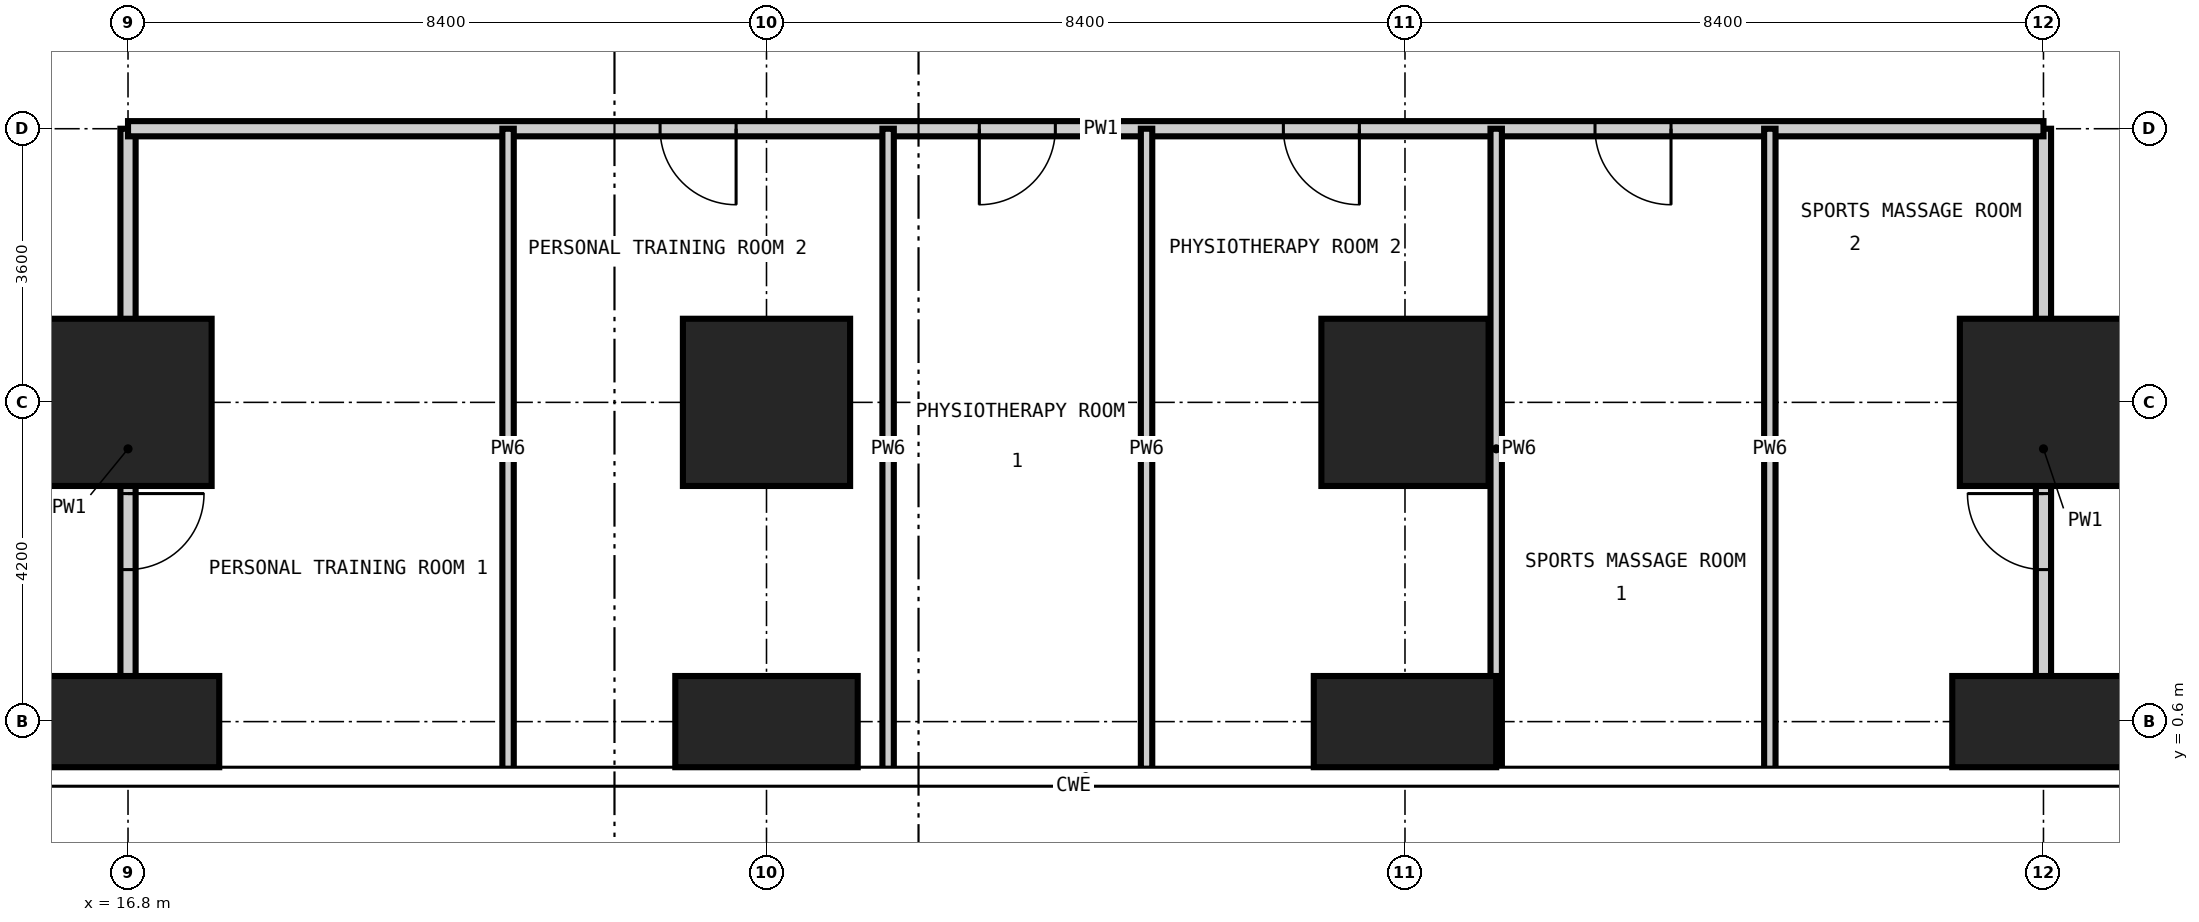
"""IFC4 building model, lengths in metres.
Left out: names, types, materials, properties, quantities, classifications, styles, units other than length and angle.
Written with IfcOpenShell. Run it as: python <this file> out.ifc"""

import sys

from ifc_helpers import new_model, si_unit, direction, frame, frame_2d, origin, origin_2d, place, context, subcontext, project, spatial, rectangle, extrude, element, fill, save


model = new_model("IFC4")
c1 = context("Model", 3, precision=1e-05, world=origin(), true_north=direction((0.0, 1.0)))
c2 = subcontext(c1, "Body", "Model", "MODEL_VIEW")
j1 = project(units=[si_unit("LENGTHUNIT", "METRE"), si_unit("PLANEANGLEUNIT", "RADIAN")], contexts=[c1])
p1 = place(None, origin())
s1 = spatial("IfcSite", under=j1, at=p1, CompositionType="ELEMENT")
p2 = place(p1, origin())
s2 = spatial("IfcBuilding", under=s1, at=p2, CompositionType="ELEMENT")
p3 = place(p2, frame((0.0, 0.0, 22.0)))
s3 = spatial("IfcBuildingStorey", under=s2, at=p3, CompositionType="ELEMENT", Elevation=22.0)
p4 = place(p3, frame((16.8, 0.6, -0.35), z_axis=(0.0, 0.0, 1.0), x_axis=(1.0, 0.0, 0.0)))
e1 = element("IfcColumn", 1, at=p4, inside=s3, PredefinedType="COLUMN", context=c2, shape_type="SweptSolid", body=[
    extrude(rectangle(XDim=2.4, YDim=1.2, at=origin_2d()), origin(), (0.0, 0.0, 1.0), 5.0),
])
p5 = place(p3, frame((16.8, 4.8, -0.35), z_axis=(0.0, 0.0, 1.0), x_axis=(1.0, 0.0, 0.0)))
e2 = element("IfcColumn", 2, at=p5, inside=s3, PredefinedType="COLUMN", context=c2, shape_type="SweptSolid", body=[
    extrude(rectangle(XDim=2.2, YDim=2.2, at=origin_2d()), origin(), (0.0, 0.0, 1.0), 5.0),
])
p6 = place(p3, frame((25.2, 0.6, -0.35), z_axis=(0.0, 0.0, 1.0), x_axis=(1.0, 0.0, 0.0)))
e3 = element("IfcColumn", 3, at=p6, inside=s3, PredefinedType="COLUMN", context=c2, shape_type="SweptSolid", body=[
    extrude(rectangle(XDim=2.4, YDim=1.2, at=origin_2d()), origin(), (0.0, 0.0, 1.0), 5.0),
])
p7 = place(p3, frame((25.2, 4.8, -0.35), z_axis=(0.0, 0.0, 1.0), x_axis=(1.0, 0.0, 0.0)))
e4 = element("IfcColumn", 4, at=p7, inside=s3, PredefinedType="COLUMN", context=c2, shape_type="SweptSolid", body=[
    extrude(rectangle(XDim=2.2, YDim=2.2, at=origin_2d()), origin(), (0.0, 0.0, 1.0), 5.0),
])
p8 = place(p3, frame((33.6, 0.6, -0.35), z_axis=(0.0, 0.0, 1.0), x_axis=(1.0, 0.0, 0.0)))
e5 = element("IfcColumn", 5, at=p8, inside=s3, PredefinedType="COLUMN", context=c2, shape_type="SweptSolid", body=[
    extrude(rectangle(XDim=2.4, YDim=1.2, at=origin_2d()), origin(), (0.0, 0.0, 1.0), 5.0),
])
p9 = place(p3, frame((33.6, 4.8, -0.35), z_axis=(0.0, 0.0, 1.0), x_axis=(1.0, 0.0, 0.0)))
e6 = element("IfcColumn", 6, at=p9, inside=s3, PredefinedType="COLUMN", context=c2, shape_type="SweptSolid", body=[
    extrude(rectangle(XDim=2.2, YDim=2.2, at=origin_2d()), origin(), (0.0, 0.0, 1.0), 5.0),
])
p10 = place(p3, frame((42.0, 0.6, -0.35), z_axis=(0.0, 0.0, 1.0), x_axis=(1.0, 0.0, 0.0)))
e7 = element("IfcColumn", 7, at=p10, inside=s3, PredefinedType="COLUMN", context=c2, shape_type="SweptSolid", body=[
    extrude(rectangle(XDim=2.4, YDim=1.2, at=origin_2d()), origin(), (0.0, 0.0, 1.0), 5.0),
])
p11 = place(p3, frame((42.0, 4.8, -0.35), z_axis=(0.0, 0.0, 1.0), x_axis=(1.0, 0.0, 0.0)))
e8 = element("IfcColumn", 8, at=p11, inside=s3, PredefinedType="COLUMN", context=c2, shape_type="SweptSolid", body=[
    extrude(rectangle(XDim=2.2, YDim=2.2, at=origin_2d()), origin(), (0.0, 0.0, 1.0), 5.0),
])
p12 = place(p3, frame((16.8, -0.023, 0.0), z_axis=(0.0, 0.0, 1.0), x_axis=(0.0, 1.0, 0.0)))
e9 = element("IfcWall", 9, at=p12, inside=s3, PredefinedType="PARTITIONING", context=c2, shape_type="SweptSolid", body=[
    extrude(rectangle(XDim=8.423, YDim=0.2, at=frame_2d((4.211, 0.0))), origin(), (0.0, 0.0, 1.0), 4.65),
])
p13 = place(p12, frame((2.623, 0.0, 0.0)))
e10 = element("IfcOpeningElement", 10, at=p13, cuts=e9, PredefinedType="OPENING", context=c2, shape_type="SweptSolid", body=[
    extrude(rectangle(XDim=1.0, YDim=2.1, at=frame_2d((0.5, 1.05))), frame((0.0, 0.11, 0.0), z_axis=(0.0, -1.0, 0.0), x_axis=(1.0, 0.0, 0.0)), (0.0, 0.0, 1.0), 0.22),
])
p14 = place(p3, frame((42.0, -0.023, 0.0), z_axis=(0.0, 0.0, 1.0), x_axis=(0.0, 1.0, 0.0)))
e11 = element("IfcWall", 11, at=p14, inside=s3, PredefinedType="PARTITIONING", context=c2, shape_type="SweptSolid", body=[
    extrude(rectangle(XDim=8.423, YDim=0.2, at=frame_2d((4.211, 0.0))), origin(), (0.0, 0.0, 1.0), 4.65),
])
p15 = place(p14, frame((2.623, 0.0, 0.0)))
e12 = element("IfcOpeningElement", 12, at=p15, cuts=e11, PredefinedType="OPENING", context=c2, shape_type="SweptSolid", body=[
    extrude(rectangle(XDim=1.0, YDim=2.1, at=frame_2d((0.5, 1.05))), frame((0.0, 0.11, 0.0), z_axis=(0.0, -1.0, 0.0), x_axis=(1.0, 0.0, 0.0)), (0.0, 0.0, 1.0), 0.22),
])
p16 = place(p3, frame((16.8, 8.4, 0.0), z_axis=(0.0, 0.0, 1.0), x_axis=(1.0, 0.0, 0.0)))
e13 = element("IfcWall", 13, at=p16, inside=s3, PredefinedType="PARTITIONING", context=c2, shape_type="SweptSolid", body=[
    extrude(rectangle(XDim=25.2, YDim=0.2, at=frame_2d((12.6, 0.0))), origin(), (0.0, 0.0, 1.0), 4.65),
])
p17 = place(p16, frame((7.0, 0.0, 0.0)))
e14 = element("IfcOpeningElement", 14, at=p17, cuts=e13, PredefinedType="OPENING", context=c2, shape_type="SweptSolid", body=[
    extrude(rectangle(XDim=1.0, YDim=2.1, at=frame_2d((0.5, 1.05))), frame((0.0, 0.11, 0.0), z_axis=(0.0, -1.0, 0.0), x_axis=(1.0, 0.0, 0.0)), (0.0, 0.0, 1.0), 0.22),
])
p18 = place(p16, frame((11.2, 0.0, 0.0)))
e15 = element("IfcOpeningElement", 15, at=p18, cuts=e13, PredefinedType="OPENING", context=c2, shape_type="SweptSolid", body=[
    extrude(rectangle(XDim=1.0, YDim=2.1, at=frame_2d((0.5, 1.05))), frame((0.0, 0.11, 0.0), z_axis=(0.0, -1.0, 0.0), x_axis=(1.0, 0.0, 0.0)), (0.0, 0.0, 1.0), 0.22),
])
p19 = place(p16, frame((15.2, 0.0, 0.0)))
e16 = element("IfcOpeningElement", 16, at=p19, cuts=e13, PredefinedType="OPENING", context=c2, shape_type="SweptSolid", body=[
    extrude(rectangle(XDim=1.0, YDim=2.1, at=frame_2d((0.5, 1.05))), frame((0.0, 0.11, 0.0), z_axis=(0.0, -1.0, 0.0), x_axis=(1.0, 0.0, 0.0)), (0.0, 0.0, 1.0), 0.22),
])
p20 = place(p16, frame((19.3, 0.0, 0.0)))
e17 = element("IfcOpeningElement", 17, at=p20, cuts=e13, PredefinedType="OPENING", context=c2, shape_type="SweptSolid", body=[
    extrude(rectangle(XDim=1.0, YDim=2.1, at=frame_2d((0.5, 1.05))), frame((0.0, 0.11, 0.0), z_axis=(0.0, -1.0, 0.0), x_axis=(1.0, 0.0, 0.0)), (0.0, 0.0, 1.0), 0.22),
])
for number, where, z_axis, x_axis in (
    (18, (21.8, -0.023, 0.0), (0.0, 0.0, 1.0), (0.0, 1.0, 0.0)),
    (19, (26.8, -0.023, 0.0), (0.0, 0.0, 1.0), (0.0, 1.0, 0.0)),
    (20, (30.2, -0.023, 0.0), (0.0, 0.0, 1.0), (0.0, 1.0, 0.0)),
    (21, (34.8, -0.023, 0.0), (0.0, 0.0, 1.0), (0.0, 1.0, 0.0)),
    (22, (38.4, -0.023, 0.0), (0.0, 0.0, 1.0), (0.0, 1.0, 0.0)),
):
    element("IfcWall", number, at=place(p3, frame(where, z_axis=z_axis, x_axis=x_axis)), inside=s3, PredefinedType="PARTITIONING", context=c2, shape_type="SweptSolid", body=[
        extrude(rectangle(XDim=8.423, YDim=0.15, at=frame_2d((4.211, 0.0))), origin(), (0.0, 0.0, 1.0), 4.65),
    ])
p21 = place(p13, frame((1.0, 0.0, 0.0), z_axis=(0.0, 0.0, 1.0), x_axis=(-1.0, 0.0, 0.0)))
e23 = element("IfcDoor", 23, at=p21, inside=s3, OperationType="SINGLE_SWING_LEFT", PredefinedType="DOOR", context=c2, shape_type="SweptSolid", body=[
    extrude(rectangle(XDim=1.0, YDim=2.1, at=frame_2d((0.5, 1.05))), frame((0.0, 0.025, 0.0), z_axis=(0.0, -1.0, 0.0), x_axis=(1.0, 0.0, 0.0)), (0.0, 0.0, 1.0), 0.05),
])
fill(e10, e23)
p22 = place(p17, frame((1.0, 0.0, 0.0), z_axis=(0.0, 0.0, 1.0), x_axis=(-1.0, 0.0, 0.0)))
e24 = element("IfcDoor", 24, at=p22, inside=s3, OperationType="SINGLE_SWING_LEFT", PredefinedType="DOOR", context=c2, shape_type="SweptSolid", body=[
    extrude(rectangle(XDim=1.0, YDim=2.1, at=frame_2d((0.5, 1.05))), frame((0.0, 0.025, 0.0), z_axis=(0.0, -1.0, 0.0), x_axis=(1.0, 0.0, 0.0)), (0.0, 0.0, 1.0), 0.05),
])
fill(e14, e24)
p23 = place(p18, frame((1.0, 0.0, 0.0), z_axis=(0.0, 0.0, 1.0), x_axis=(-1.0, 0.0, 0.0)))
e25 = element("IfcDoor", 25, at=p23, inside=s3, OperationType="SINGLE_SWING_RIGHT", PredefinedType="DOOR", context=c2, shape_type="SweptSolid", body=[
    extrude(rectangle(XDim=1.0, YDim=2.1, at=frame_2d((0.5, 1.05))), frame((0.0, 0.025, 0.0), z_axis=(0.0, -1.0, 0.0), x_axis=(1.0, 0.0, 0.0)), (0.0, 0.0, 1.0), 0.05),
])
fill(e15, e25)
p24 = place(p19, frame((1.0, 0.0, 0.0), z_axis=(0.0, 0.0, 1.0), x_axis=(-1.0, 0.0, 0.0)))
e26 = element("IfcDoor", 26, at=p24, inside=s3, OperationType="SINGLE_SWING_LEFT", PredefinedType="DOOR", context=c2, shape_type="SweptSolid", body=[
    extrude(rectangle(XDim=1.0, YDim=2.1, at=frame_2d((0.5, 1.05))), frame((0.0, 0.025, 0.0), z_axis=(0.0, -1.0, 0.0), x_axis=(1.0, 0.0, 0.0)), (0.0, 0.0, 1.0), 0.05),
])
fill(e16, e26)
p25 = place(p20, frame((1.0, 0.0, 0.0), z_axis=(0.0, 0.0, 1.0), x_axis=(-1.0, 0.0, 0.0)))
e27 = element("IfcDoor", 27, at=p25, inside=s3, OperationType="SINGLE_SWING_LEFT", PredefinedType="DOOR", context=c2, shape_type="SweptSolid", body=[
    extrude(rectangle(XDim=1.0, YDim=2.1, at=frame_2d((0.5, 1.05))), frame((0.0, 0.025, 0.0), z_axis=(0.0, -1.0, 0.0), x_axis=(1.0, 0.0, 0.0)), (0.0, 0.0, 1.0), 0.05),
])
fill(e17, e27)
p26 = place(p15, origin())
e28 = element("IfcDoor", 28, at=p26, inside=s3, OperationType="SINGLE_SWING_RIGHT", PredefinedType="DOOR", context=c2, shape_type="SweptSolid", body=[
    extrude(rectangle(XDim=1.0, YDim=2.1, at=frame_2d((0.5, 1.05))), frame((0.0, 0.025, 0.0), z_axis=(0.0, -1.0, 0.0), x_axis=(1.0, 0.0, 0.0)), (0.0, 0.0, 1.0), 0.05),
])
fill(e12, e28)
save(model, sys.argv[1])
